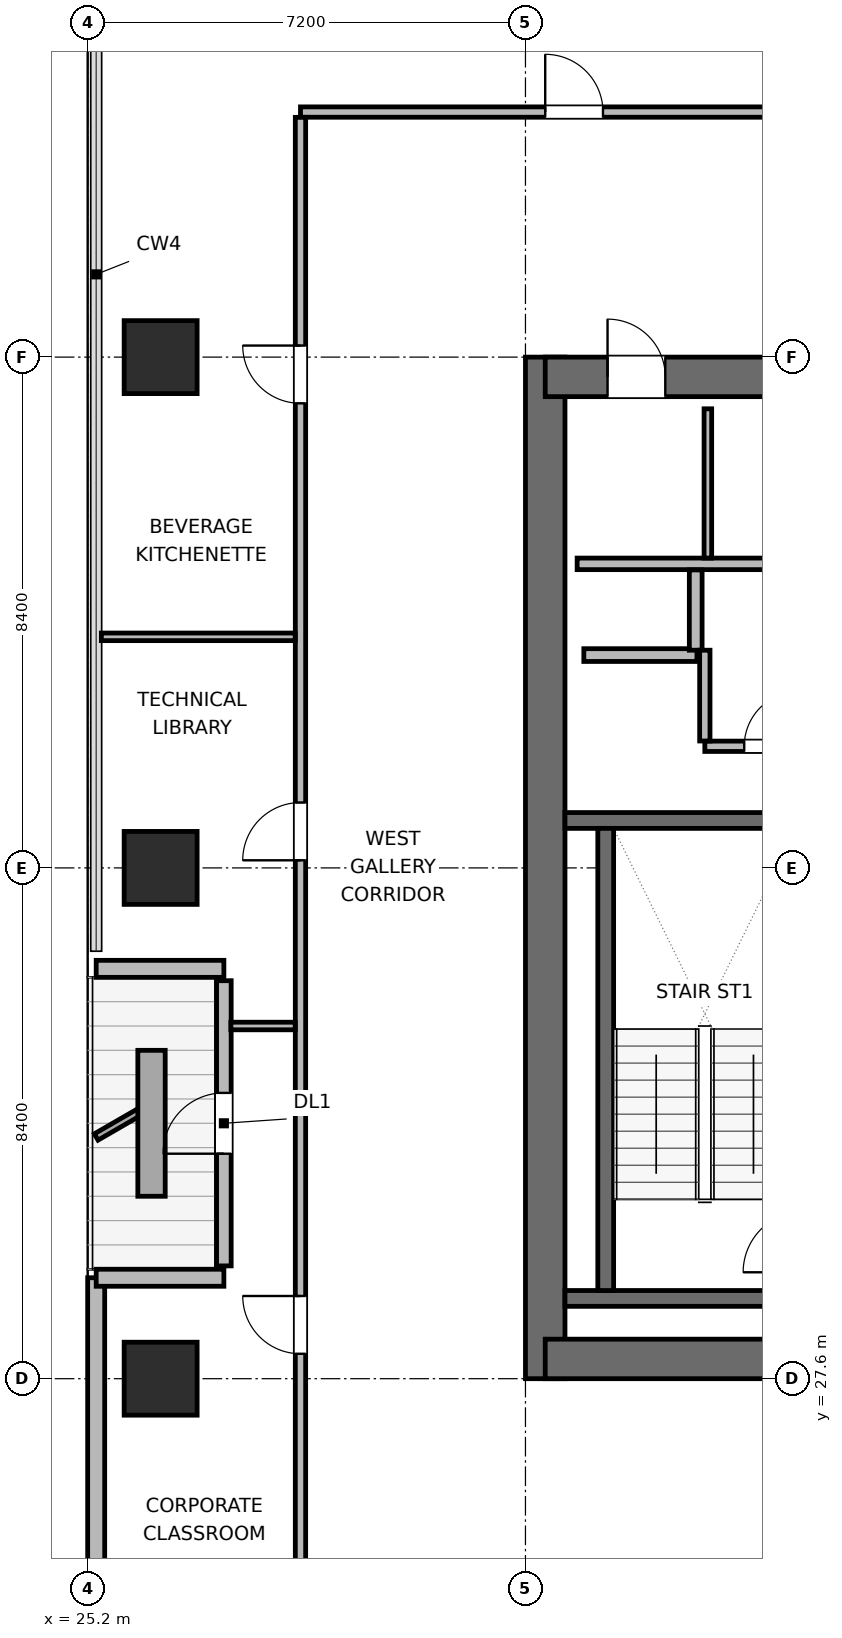
"""IFC4 building model, lengths in metres.
Left out: names, types, materials, properties, quantities, classifications, styles, units other than length and angle.
Written with IfcOpenShell. Run it as: python <this file> out.ifc"""

import sys

from ifc_helpers import new_model, si_unit, direction, frame, frame_2d, origin, origin_2d, place, context, subcontext, project, spatial, rectangle, extrude, element, fill, save


model = new_model("IFC4")
c1 = context("Model", 3, precision=1e-05, world=origin(), true_north=direction((0.0, 1.0)))
c2 = subcontext(c1, "Body", "Model", "MODEL_VIEW")
j1 = project(units=[si_unit("LENGTHUNIT", "METRE"), si_unit("PLANEANGLEUNIT", "RADIAN")], contexts=[c1])
p1 = place(None, origin())
s1 = spatial("IfcSite", under=j1, at=p1, CompositionType="ELEMENT")
p2 = place(p1, origin())
s2 = spatial("IfcBuilding", under=s1, at=p2, CompositionType="ELEMENT")
p3 = place(p2, frame((0.0, 0.0, 223.2)))
s3 = spatial("IfcBuildingStorey", under=s2, at=p3, CompositionType="ELEMENT", Elevation=223.2)
p4 = place(p3, frame((32.725, 27.6, 0.0), z_axis=(0.0, 0.0, 1.0), x_axis=(0.0, 1.0, 0.0)))
e1 = element("IfcWall", 1, at=p4, inside=s3, PredefinedType="SHEAR", context=c2, shape_type="SweptSolid", body=[
    extrude(rectangle(XDim=16.8, YDim=0.65, at=frame_2d((8.4, 0.0))), origin(), (0.0, 0.0, 1.0), 3.9),
])
p5 = place(p3, frame((32.725, 27.925, 0.0), z_axis=(0.0, 0.0, 1.0), x_axis=(1.0, 0.0, 0.0)))
e2 = element("IfcWall", 2, at=p5, inside=s3, PredefinedType="SHEAR", context=c2, shape_type="SweptSolid", body=[
    extrude(rectangle(XDim=9.35, YDim=0.65, at=frame_2d((4.675, 0.0))), origin(), (0.0, 0.0, 1.0), 3.9),
])
p6 = place(p5, frame((5.025, 0.0, 0.0)))
e3 = element("IfcOpeningElement", 3, at=p6, cuts=e2, PredefinedType="OPENING", context=c2, shape_type="SweptSolid", body=[
    extrude(rectangle(XDim=1.05, YDim=2.04, at=frame_2d((0.525, 1.02))), frame((0.0, 0.335, 0.0), z_axis=(0.0, -1.0, 0.0), x_axis=(1.0, 0.0, 0.0)), (0.0, 0.0, 1.0), 0.67),
])
p7 = place(p3, frame((32.725, 44.075, 0.0), z_axis=(0.0, 0.0, 1.0), x_axis=(1.0, 0.0, 0.0)))
e4 = element("IfcWall", 4, at=p7, inside=s3, PredefinedType="SHEAR", context=c2, shape_type="SweptSolid", body=[
    extrude(rectangle(XDim=9.35, YDim=0.65, at=frame_2d((4.675, 0.0))), origin(), (0.0, 0.0, 1.0), 3.9),
])
p8 = place(p7, frame((1.025, 0.0, 0.0)))
e5 = element("IfcOpeningElement", 5, at=p8, cuts=e4, PredefinedType="OPENING", context=c2, shape_type="SweptSolid", body=[
    extrude(rectangle(XDim=0.95, YDim=2.04, at=frame_2d((0.475, 1.02))), frame((0.0, 0.335, 0.0), z_axis=(0.0, -1.0, 0.0), x_axis=(1.0, 0.0, 0.0)), (0.0, 0.0, 1.0), 0.67),
])
p9 = place(p7, frame((4.275, 0.0, 0.0)))
e6 = element("IfcOpeningElement", 6, at=p9, cuts=e4, PredefinedType="OPENING", context=c2, shape_type="SweptSolid", body=[
    extrude(rectangle(XDim=0.9, YDim=2.02, at=frame_2d((0.45, 1.01))), frame((0.0, 0.335, 0.0), z_axis=(0.0, -1.0, 0.0), x_axis=(1.0, 0.0, 0.0)), (0.0, 0.0, 1.0), 0.67),
])
p10 = place(p7, frame((7.175, 0.0, 0.0)))
e7 = element("IfcOpeningElement", 7, at=p10, cuts=e4, PredefinedType="OPENING", context=c2, shape_type="SweptSolid", body=[
    extrude(rectangle(XDim=0.9, YDim=2.02, at=frame_2d((0.45, 1.01))), frame((0.0, 0.335, 0.0), z_axis=(0.0, -1.0, 0.0), x_axis=(1.0, 0.0, 0.0)), (0.0, 0.0, 1.0), 0.67),
])
for number, where, z_axis, x_axis in (
    (8, (33.05, 28.92, 0.0), (0.0, 0.0, 1.0), (1.0, 0.0, 0.0)),
    (9, (33.05, 36.78, 0.0), (0.0, 0.0, 1.0), (1.0, 0.0, 0.0)),
):
    element("IfcWall", number, at=place(p3, frame(where, z_axis=z_axis, x_axis=x_axis)), inside=s3, PredefinedType="SHEAR", context=c2, shape_type="SweptSolid", body=[
        extrude(rectangle(XDim=4.06, YDim=0.26, at=frame_2d((2.03, 0.0))), origin(), (0.0, 0.0, 1.0), 3.9),
    ])
p11 = place(p3, frame((33.72, 29.05, 0.0), z_axis=(0.0, 0.0, 1.0), x_axis=(0.0, 1.0, 0.0)))
e10 = element("IfcWall", 10, at=p11, inside=s3, PredefinedType="SHEAR", context=c2, shape_type="SweptSolid", body=[
    extrude(rectangle(XDim=7.6, YDim=0.26, at=frame_2d((3.8, 0.0))), origin(), (0.0, 0.0, 1.0), 3.9),
])
for number, where, z_axis, x_axis in (
    (11, (26.4, 27.6, 0.0), (0.0, 0.0, 1.0), (1.0, 0.0, 0.0)),
    (12, (26.4, 36.0, 0.0), (0.0, 0.0, 1.0), (1.0, 0.0, 0.0)),
    (13, (26.4, 44.4, 0.0), (0.0, 0.0, 1.0), (1.0, 0.0, 0.0)),
):
    element("IfcColumn", number, at=place(p3, frame(where, z_axis=z_axis, x_axis=x_axis)), inside=s3, PredefinedType="COLUMN", context=c2, shape_type="SweptSolid", body=[
        extrude(rectangle(XDim=1.2, YDim=1.2, at=origin_2d()), origin(), (0.0, 0.0, 1.0), 3.9),
    ])
p12 = place(p3, frame((25.34, 23.818, 0.0), z_axis=(0.0, 0.0, 1.0), x_axis=(0.0, 1.0, 0.0)))
e14 = element("IfcWall", 14, at=p12, inside=s3, PredefinedType="SOLIDWALL", context=c2, shape_type="SweptSolid", body=[
    extrude(rectangle(XDim=5.442, YDim=0.28, at=frame_2d((2.721, 0.0))), origin(), (0.0, 0.0, 1.0), 3.68),
])
p13 = place(p3, frame((25.34, 29.26, 0.0), z_axis=(0.0, 0.0, 1.0), x_axis=(1.0, 0.0, 0.0)))
e15 = element("IfcWall", 15, at=p13, inside=s3, PredefinedType="SOLIDWALL", context=c2, shape_type="SweptSolid", body=[
    extrude(rectangle(XDim=2.1, YDim=0.28, at=frame_2d((1.05, 0.0))), origin(), (0.0, 0.0, 1.0), 3.116),
])
p14 = place(p3, frame((27.44, 29.455, 0.0), z_axis=(0.0, 0.0, 1.0), x_axis=(0.0, 1.0, 0.0)))
e16 = element("IfcWall", 16, at=p14, inside=s3, PredefinedType="SOLIDWALL", context=c2, shape_type="SweptSolid", body=[
    extrude(rectangle(XDim=4.69, YDim=0.24, at=frame_2d((2.345, 0.0))), origin(), (0.0, 0.0, 1.0), 3.248),
])
p15 = place(p14, frame((1.845, 0.0, 0.0)))
e17 = element("IfcOpeningElement", 17, at=p15, cuts=e16, PredefinedType="OPENING", context=c2, shape_type="SweptSolid", body=[
    extrude(rectangle(XDim=1.0, YDim=2.02, at=frame_2d((0.5, 1.01))), frame((0.0, 0.13, 0.0), z_axis=(0.0, -1.0, 0.0), x_axis=(1.0, 0.0, 0.0)), (0.0, 0.0, 1.0), 0.26),
])
p16 = place(p3, frame((27.44, 34.34, 0.0), z_axis=(0.0, 0.0, 1.0), x_axis=(-1.0, 0.0, 0.0)))
e18 = element("IfcWall", 18, at=p16, inside=s3, PredefinedType="SOLIDWALL", context=c2, shape_type="SweptSolid", body=[
    extrude(rectangle(XDim=2.1, YDim=0.28, at=frame_2d((1.05, 0.0))), origin(), (0.0, 0.0, 1.0), 3.116),
])
p17 = place(p3, frame((33.25, 41.0, 0.0), z_axis=(0.0, 0.0, 1.0), x_axis=(1.0, 0.0, 0.0)))
e19 = element("IfcWall", 19, at=p17, inside=s3, PredefinedType="PLUMBINGWALL", context=c2, shape_type="SweptSolid", body=[
    extrude(rectangle(XDim=8.3, YDim=0.19, at=frame_2d((4.15, 0.0))), origin(), (0.0, 0.0, 1.0), 3.68),
])
p18 = place(p3, frame((35.4, 41.095, 0.0), z_axis=(0.0, 0.0, 1.0), x_axis=(0.0, 1.0, 0.0)))
e20 = element("IfcWall", 20, at=p18, inside=s3, PredefinedType="PARTITIONING", context=c2, shape_type="SweptSolid", body=[
    extrude(rectangle(XDim=2.455, YDim=0.125, at=frame_2d((1.228, 0.0))), origin(), (0.0, 0.0, 1.0), 3.68),
])
p19 = place(p3, frame((33.36, 39.5, 0.0), z_axis=(0.0, 0.0, 1.0), x_axis=(1.0, 0.0, 0.0)))
e21 = element("IfcWall", 21, at=p19, inside=s3, PredefinedType="PARTITIONING", context=c2, shape_type="SweptSolid", body=[
    extrude(rectangle(XDim=1.86, YDim=0.21, at=frame_2d((0.93, 0.0))), origin(), (0.0, 0.0, 1.0), 3.68),
])
p20 = place(p3, frame((35.2, 39.58, 0.0), z_axis=(0.0, 0.0, 1.0), x_axis=(0.0, 1.0, 0.0)))
e22 = element("IfcWall", 22, at=p20, inside=s3, PredefinedType="PARTITIONING", context=c2, shape_type="SweptSolid", body=[
    extrude(rectangle(XDim=1.32, YDim=0.21, at=frame_2d((0.66, 0.0))), origin(), (0.0, 0.0, 1.0), 3.68),
])
p21 = place(p3, frame((35.35, 38.0, 0.0), z_axis=(0.0, 0.0, 1.0), x_axis=(1.0, 0.0, 0.0)))
e23 = element("IfcWall", 23, at=p21, inside=s3, PredefinedType="PARTITIONING", context=c2, shape_type="SweptSolid", body=[
    extrude(rectangle(XDim=6.1, YDim=0.17, at=frame_2d((3.05, 0.0))), origin(), (0.0, 0.0, 1.0), 3.68),
])
p22 = place(p21, frame((0.648, 0.0, 0.0)))
e24 = element("IfcOpeningElement", 24, at=p22, cuts=e23, PredefinedType="OPENING", context=c2, shape_type="SweptSolid", body=[
    extrude(rectangle(XDim=0.9, YDim=2.02, at=frame_2d((0.45, 1.01))), frame((0.0, 0.095, 0.0), z_axis=(0.0, -1.0, 0.0), x_axis=(1.0, 0.0, 0.0)), (0.0, 0.0, 1.0), 0.19),
])
p23 = place(p21, frame((3.698, 0.0, 0.0)))
e25 = element("IfcOpeningElement", 25, at=p23, cuts=e23, PredefinedType="OPENING", context=c2, shape_type="SweptSolid", body=[
    extrude(rectangle(XDim=0.9, YDim=2.02, at=frame_2d((0.45, 1.01))), frame((0.0, 0.095, 0.0), z_axis=(0.0, -1.0, 0.0), x_axis=(1.0, 0.0, 0.0)), (0.0, 0.0, 1.0), 0.19),
])
p24 = place(p3, frame((35.35, 38.087, 0.0), z_axis=(0.0, 0.0, 1.0), x_axis=(0.0, 1.0, 0.0)))
e26 = element("IfcWall", 26, at=p24, inside=s3, PredefinedType="PARTITIONING", context=c2, shape_type="SweptSolid", body=[
    extrude(rectangle(XDim=1.493, YDim=0.17, at=frame_2d((0.747, 0.0))), origin(), (0.0, 0.0, 1.0), 3.68),
])
p25 = place(p3, frame((28.7, 48.43, 0.0), z_axis=(0.0, 0.0, 1.0), x_axis=(1.0, 0.0, 0.0)))
e27 = element("IfcWall", 27, at=p25, inside=s3, PredefinedType="PARTITIONING", context=c2, shape_type="SweptSolid", body=[
    extrude(rectangle(XDim=34.9, YDim=0.17, at=frame_2d((17.45, 0.0))), origin(), (0.0, 0.0, 1.0), 3.68),
])
p26 = place(p25, frame((4.025, 0.0, 0.0)))
e28 = element("IfcOpeningElement", 28, at=p26, cuts=e27, PredefinedType="OPENING", context=c2, shape_type="SweptSolid", body=[
    extrude(rectangle(XDim=0.95, YDim=2.04, at=frame_2d((0.475, 1.02))), frame((0.0, 0.095, 0.0), z_axis=(0.0, -1.0, 0.0), x_axis=(1.0, 0.0, 0.0)), (0.0, 0.0, 1.0), 0.19),
])
p27 = place(p25, frame((9.96, 0.0, 0.0)))
e29 = element("IfcOpeningElement", 29, at=p27, cuts=e27, PredefinedType="OPENING", context=c2, shape_type="SweptSolid", body=[
    extrude(rectangle(XDim=0.95, YDim=2.04, at=frame_2d((0.475, 1.02))), frame((0.0, 0.095, 0.0), z_axis=(0.0, -1.0, 0.0), x_axis=(1.0, 0.0, 0.0)), (0.0, 0.0, 1.0), 0.19),
])
p28 = place(p25, frame((15.94, 0.0, 0.0)))
e30 = element("IfcOpeningElement", 30, at=p28, cuts=e27, PredefinedType="OPENING", context=c2, shape_type="SweptSolid", body=[
    extrude(rectangle(XDim=0.95, YDim=2.04, at=frame_2d((0.475, 1.02))), frame((0.0, 0.095, 0.0), z_axis=(0.0, -1.0, 0.0), x_axis=(1.0, 0.0, 0.0)), (0.0, 0.0, 1.0), 0.19),
])
p29 = place(p25, frame((23.35, 0.0, 0.0)))
e31 = element("IfcOpeningElement", 31, at=p29, cuts=e27, PredefinedType="OPENING", context=c2, shape_type="SweptSolid", body=[
    extrude(rectangle(XDim=0.95, YDim=2.04, at=frame_2d((0.475, 1.02))), frame((0.0, 0.095, 0.0), z_axis=(0.0, -1.0, 0.0), x_axis=(1.0, 0.0, 0.0)), (0.0, 0.0, 1.0), 0.19),
])
p30 = place(p25, frame((30.32, 0.0, 0.0)))
e32 = element("IfcOpeningElement", 32, at=p30, cuts=e27, PredefinedType="OPENING", context=c2, shape_type="SweptSolid", body=[
    extrude(rectangle(XDim=0.95, YDim=2.04, at=frame_2d((0.475, 1.02))), frame((0.0, 0.095, 0.0), z_axis=(0.0, -1.0, 0.0), x_axis=(1.0, 0.0, 0.0)), (0.0, 0.0, 1.0), 0.19),
])
p31 = place(p3, frame((28.7, 23.657, 0.0), z_axis=(0.0, 0.0, 1.0), x_axis=(0.0, 1.0, 0.0)))
e33 = element("IfcWall", 33, at=p31, inside=s3, PredefinedType="PARTITIONING", context=c2, shape_type="SweptSolid", body=[
    extrude(rectangle(XDim=24.686, YDim=0.17, at=frame_2d((12.343, 0.0))), origin(), (0.0, 0.0, 1.0), 3.68),
])
p32 = place(p31, frame((4.353, 0.0, 0.0)))
e34 = element("IfcOpeningElement", 34, at=p32, cuts=e33, PredefinedType="OPENING", context=c2, shape_type="SweptSolid", body=[
    extrude(rectangle(XDim=0.95, YDim=2.04, at=frame_2d((0.475, 1.02))), frame((0.0, 0.095, 0.0), z_axis=(0.0, -1.0, 0.0), x_axis=(1.0, 0.0, 0.0)), (0.0, 0.0, 1.0), 0.19),
])
p33 = place(p31, frame((12.468, 0.0, 0.0)))
e35 = element("IfcOpeningElement", 35, at=p33, cuts=e33, PredefinedType="OPENING", context=c2, shape_type="SweptSolid", body=[
    extrude(rectangle(XDim=0.95, YDim=2.04, at=frame_2d((0.475, 1.02))), frame((0.0, 0.095, 0.0), z_axis=(0.0, -1.0, 0.0), x_axis=(1.0, 0.0, 0.0)), (0.0, 0.0, 1.0), 0.19),
])
p34 = place(p31, frame((19.983, 0.0, 0.0)))
e36 = element("IfcOpeningElement", 36, at=p34, cuts=e33, PredefinedType="OPENING", context=c2, shape_type="SweptSolid", body=[
    extrude(rectangle(XDim=0.95, YDim=2.04, at=frame_2d((0.475, 1.02))), frame((0.0, 0.095, 0.0), z_axis=(0.0, -1.0, 0.0), x_axis=(1.0, 0.0, 0.0)), (0.0, 0.0, 1.0), 0.19),
])
p35 = place(p3, frame((27.555, 33.4, 0.0), z_axis=(0.0, 0.0, 1.0), x_axis=(1.0, 0.0, 0.0)))
e37 = element("IfcWall", 37, at=p35, inside=s3, PredefinedType="PARTITIONING", context=c2, shape_type="SweptSolid", body=[
    extrude(rectangle(XDim=1.058, YDim=0.125, at=frame_2d((0.529, 0.0))), origin(), (0.0, 0.0, 1.0), 3.68),
])
p36 = place(p3, frame((25.425, 39.8, 0.0), z_axis=(0.0, 0.0, 1.0), x_axis=(1.0, 0.0, 0.0)))
e38 = element("IfcWall", 38, at=p36, inside=s3, PredefinedType="PARTITIONING", context=c2, shape_type="SweptSolid", body=[
    extrude(rectangle(XDim=3.188, YDim=0.125, at=frame_2d((1.594, 0.0))), origin(), (0.0, 0.0, 1.0), 3.68),
])
p37 = place(p15, origin())
e39 = element("IfcDoor", 39, at=p37, inside=s3, OperationType="SINGLE_SWING_LEFT", PredefinedType="DOOR", context=c2, shape_type="SweptSolid", body=[
    extrude(rectangle(XDim=1.0, YDim=2.02, at=frame_2d((0.5, 1.01))), frame((0.0, 0.025, 0.0), z_axis=(0.0, -1.0, 0.0), x_axis=(1.0, 0.0, 0.0)), (0.0, 0.0, 1.0), 0.05),
])
fill(e17, e39)
p38 = place(p8, origin())
e40 = element("IfcDoor", 40, at=p38, inside=s3, OperationType="SINGLE_SWING_LEFT", PredefinedType="DOOR", context=c2, shape_type="SweptSolid", body=[
    extrude(rectangle(XDim=0.95, YDim=2.04, at=frame_2d((0.475, 1.02))), frame((0.0, 0.025, 0.0), z_axis=(0.0, -1.0, 0.0), x_axis=(1.0, 0.0, 0.0)), (0.0, 0.0, 1.0), 0.05),
])
fill(e5, e40)
p39 = place(p22, origin())
e41 = element("IfcDoor", 41, at=p39, inside=s3, OperationType="SINGLE_SWING_RIGHT", PredefinedType="DOOR", context=c2, shape_type="SweptSolid", body=[
    extrude(rectangle(XDim=0.9, YDim=2.02, at=frame_2d((0.45, 1.01))), frame((0.0, 0.025, 0.0), z_axis=(0.0, -1.0, 0.0), x_axis=(1.0, 0.0, 0.0)), (0.0, 0.0, 1.0), 0.05),
])
fill(e24, e41)
p40 = place(p26, origin())
e42 = element("IfcDoor", 42, at=p40, inside=s3, OperationType="SINGLE_SWING_LEFT", PredefinedType="DOOR", context=c2, shape_type="SweptSolid", body=[
    extrude(rectangle(XDim=0.95, YDim=2.04, at=frame_2d((0.475, 1.02))), frame((0.0, 0.025, 0.0), z_axis=(0.0, -1.0, 0.0), x_axis=(1.0, 0.0, 0.0)), (0.0, 0.0, 1.0), 0.05),
])
fill(e28, e42)
p41 = place(p32, origin())
e43 = element("IfcDoor", 43, at=p41, inside=s3, OperationType="SINGLE_SWING_RIGHT", PredefinedType="DOOR", context=c2, shape_type="SweptSolid", body=[
    extrude(rectangle(XDim=0.95, YDim=2.04, at=frame_2d((0.475, 1.02))), frame((0.0, 0.025, 0.0), z_axis=(0.0, -1.0, 0.0), x_axis=(1.0, 0.0, 0.0)), (0.0, 0.0, 1.0), 0.05),
])
fill(e34, e43)
p42 = place(p33, origin())
e44 = element("IfcDoor", 44, at=p42, inside=s3, OperationType="SINGLE_SWING_LEFT", PredefinedType="DOOR", context=c2, shape_type="SweptSolid", body=[
    extrude(rectangle(XDim=0.95, YDim=2.04, at=frame_2d((0.475, 1.02))), frame((0.0, 0.025, 0.0), z_axis=(0.0, -1.0, 0.0), x_axis=(1.0, 0.0, 0.0)), (0.0, 0.0, 1.0), 0.05),
])
fill(e35, e44)
p43 = place(p34, origin())
e45 = element("IfcDoor", 45, at=p43, inside=s3, OperationType="SINGLE_SWING_RIGHT", PredefinedType="DOOR", context=c2, shape_type="SweptSolid", body=[
    extrude(rectangle(XDim=0.95, YDim=2.04, at=frame_2d((0.475, 1.02))), frame((0.0, 0.025, 0.0), z_axis=(0.0, -1.0, 0.0), x_axis=(1.0, 0.0, 0.0)), (0.0, 0.0, 1.0), 0.05),
])
fill(e36, e45)
save(model, sys.argv[1])
